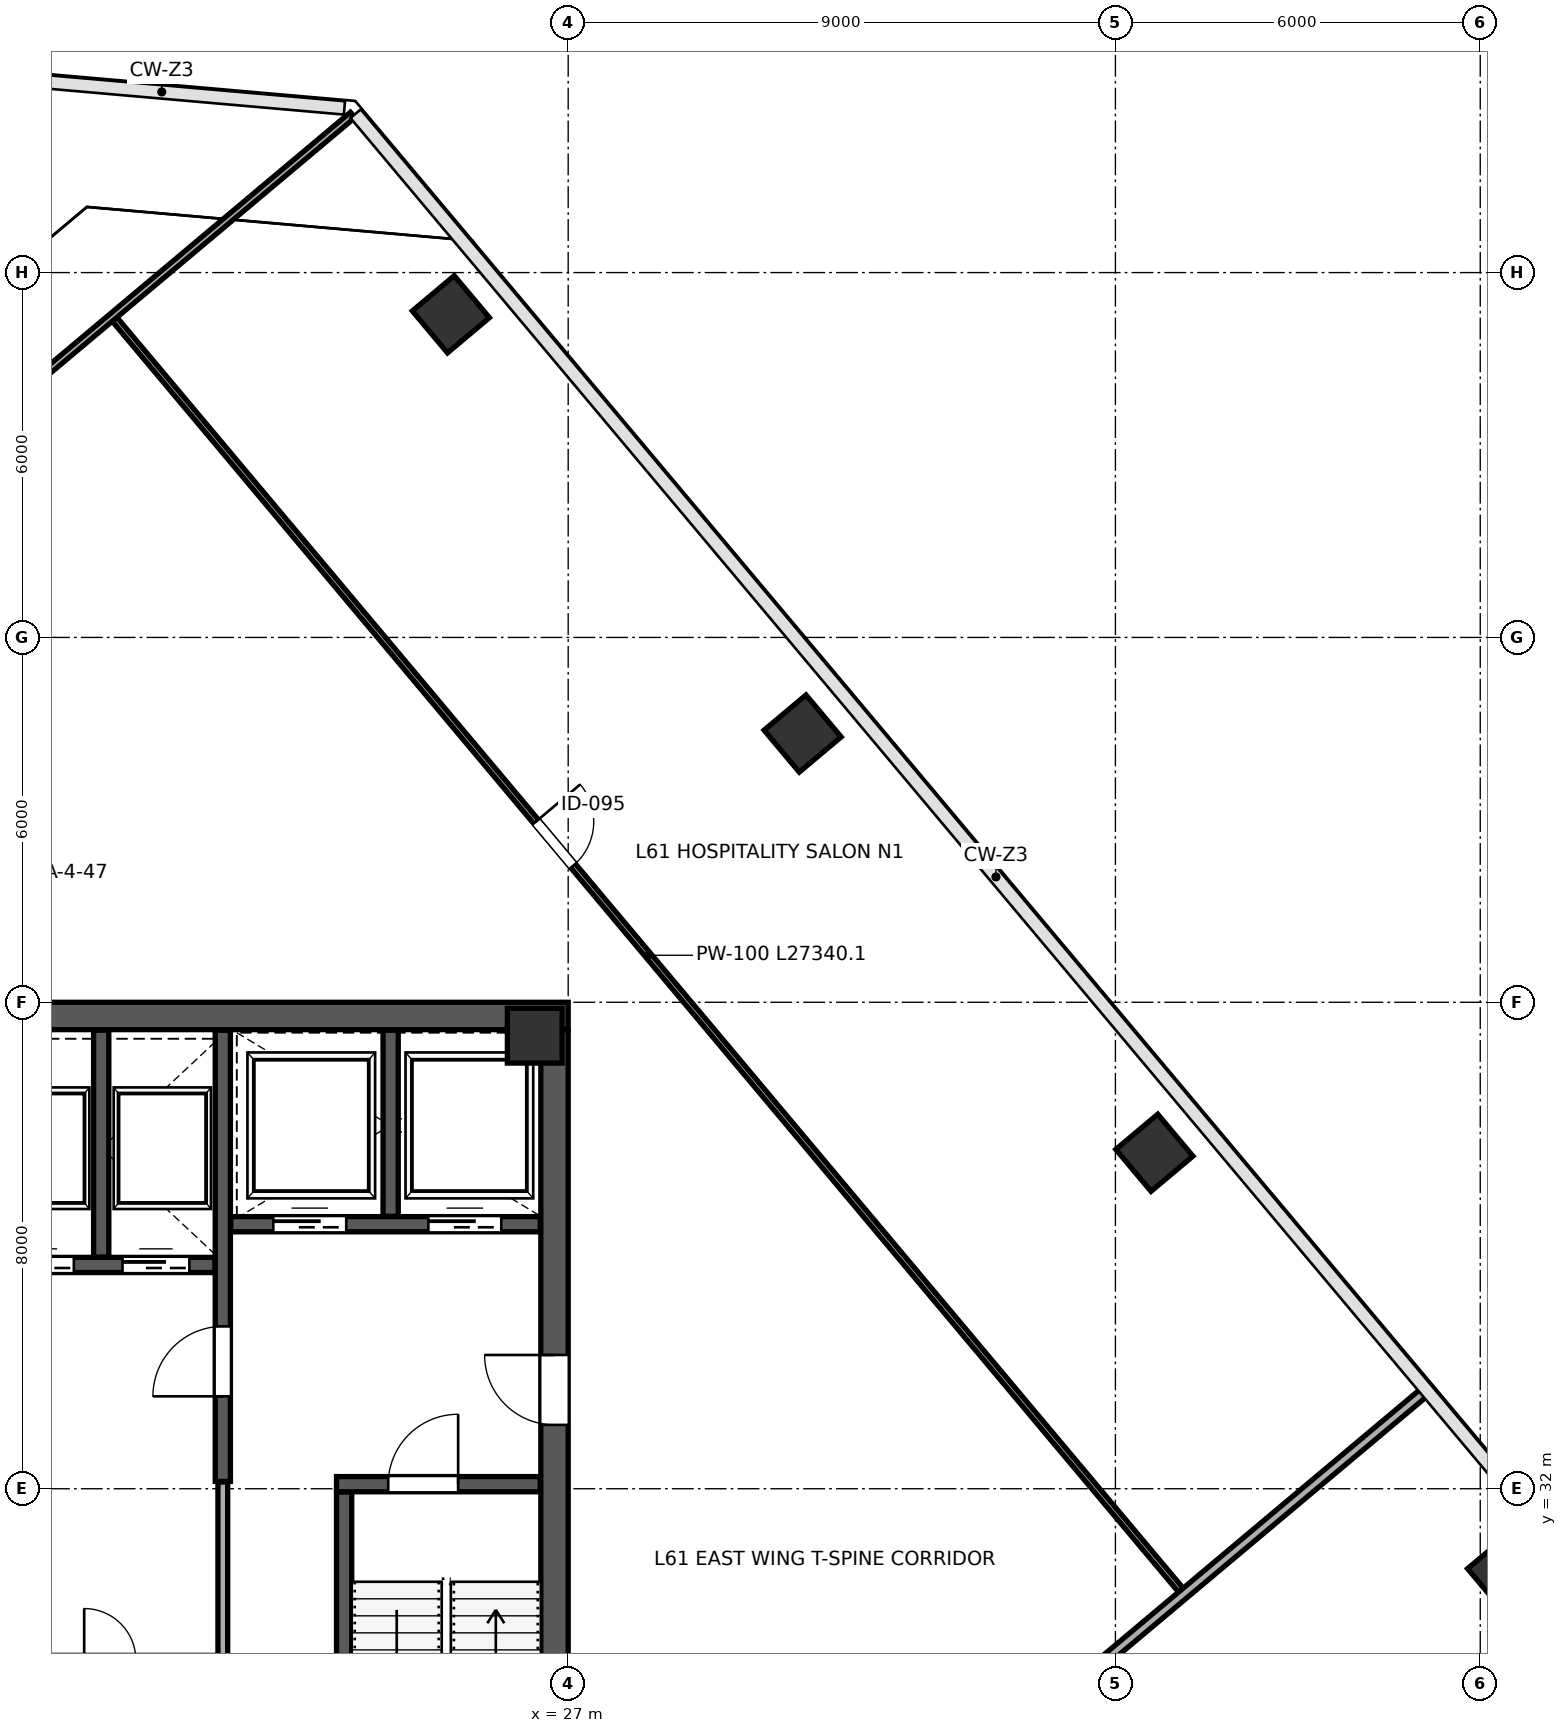
"""IFC4 building model, lengths in metres.
Left out: names, types, materials, properties, quantities, classifications, styles, units other than length and angle.
Written with IfcOpenShell. Run it as: python <this file> out.ifc"""

import sys

from ifc_helpers import new_model, si_unit, direction, frame, frame_2d, origin, origin_2d, place, context, subcontext, project, spatial, rectangle, extrude, source, transform, mapped, element, fill, save


model = new_model("IFC4")
c1 = context("Model", 3, precision=1e-05, world=origin(), true_north=direction((0.0, 1.0)))
c2 = subcontext(c1, "Body", "Model", "MODEL_VIEW")
j1 = project(units=[si_unit("LENGTHUNIT", "METRE"), si_unit("PLANEANGLEUNIT", "RADIAN")], contexts=[c1])
p1 = place(None, origin())
s1 = spatial("IfcSite", under=j1, at=p1, CompositionType="ELEMENT")
p2 = place(p1, origin())
s2 = spatial("IfcBuilding", under=s1, at=p2, CompositionType="ELEMENT")
p3 = place(p2, frame((0.0, 0.0, 271.0)))
s3 = spatial("IfcBuildingStorey", under=s2, at=p3, CompositionType="ELEMENT", Elevation=271.0)
m1 = source(origin(), c2, "Body", "SweptSolid", [
    extrude(rectangle(XDim=0.9, YDim=0.9, at=origin_2d()), origin(), (0.0, 0.0, 1.0), 4.198),
])
p4 = place(p3, frame((26.45, 39.45, 0.001), z_axis=(0.0, 0.0, 1.0), x_axis=(1.0, 0.0, 0.0)))
e1 = element("IfcColumn", 1, at=p4, inside=s3, PredefinedType="COLUMN", context=c2, shape_type="MappedRepresentation", body=[
    mapped(m1, transform((0.0, 0.0, 0.0), scale=1.0)),
])
m2 = source(origin(), c2, "Body", "SweptSolid", [
    extrude(rectangle(XDim=0.9, YDim=0.9, at=origin_2d()), origin(), (0.0, 0.0, 1.0), 4.198),
])
for number, where, z_axis, x_axis in (
    (2, (25.071, 51.314, 0.001), (0.0, 0.0, 1.0), (-0.643, 0.766, 0.0)),
    (3, (30.856, 44.419, 0.001), (0.0, 0.0, 1.0), (-0.643, 0.766, 0.0)),
    (4, (36.641, 37.525, 0.001), (0.0, 0.0, 1.0), (-0.643, 0.766, 0.0)),
    (5, (42.426, 30.631, 0.001), (0.0, 0.0, 1.0), (-0.643, 0.766, 0.0)),
):
    element("IfcColumn", number, at=place(p3, frame(where, z_axis=z_axis, x_axis=x_axis)), inside=s3, PredefinedType="COLUMN", context=c2, shape_type="MappedRepresentation", body=[
        mapped(m2, transform((0.0, 0.0, 0.0), scale=1.0)),
    ])
p5 = place(p3, frame((26.775, 24.45, 0.0), z_axis=(0.0, 0.0, 1.0), x_axis=(0.0, 1.0, 0.0)))
e6 = element("IfcWall", 6, at=p5, inside=s3, PredefinedType="SHEAR", context=c2, shape_type="SweptSolid", body=[
    extrude(rectangle(XDim=15.1, YDim=0.45, at=frame_2d((7.55, 0.0))), origin(), (0.0, 0.0, 1.0), 3.96),
])
p6 = place(p5, frame((8.6, 0.0, 0.0)))
e7 = element("IfcOpeningElement", 7, at=p6, cuts=e6, PredefinedType="OPENING", context=c2, shape_type="SweptSolid", body=[
    extrude(rectangle(XDim=1.15, YDim=2.2, at=frame_2d((0.575, 1.1))), frame((0.0, 0.235, 0.0), z_axis=(0.0, -1.0, 0.0), x_axis=(1.0, 0.0, 0.0)), (0.0, 0.0, 1.0), 0.47),
])
p7 = place(p3, frame((9.0, 39.775, 0.0), z_axis=(0.0, 0.0, 1.0), x_axis=(1.0, 0.0, 0.0)))
e8 = element("IfcWall", 8, at=p7, inside=s3, PredefinedType="SHEAR", context=c2, shape_type="SweptSolid", body=[
    extrude(rectangle(XDim=18.0, YDim=0.45, at=frame_2d((9.0, 0.0))), origin(), (0.0, 0.0, 1.0), 3.96),
])
p8 = place(p3, frame((23.315, 24.46, 0.0), z_axis=(0.0, 0.0, 1.0), x_axis=(0.0, 1.0, 0.0)))
e9 = element("IfcWall", 9, at=p8, inside=s3, PredefinedType="SHEAR", context=c2, shape_type="SweptSolid", body=[
    extrude(rectangle(XDim=7.49, YDim=0.25, at=frame_2d((3.745, 0.0))), origin(), (0.0, 0.0, 1.0), 3.96),
])
p9 = place(p3, frame((23.19, 32.075, 0.0), z_axis=(0.0, 0.0, 1.0), x_axis=(1.0, 0.0, 0.0)))
e10 = element("IfcWall", 10, at=p9, inside=s3, PredefinedType="SHEAR", context=c2, shape_type="SweptSolid", body=[
    extrude(rectangle(XDim=3.35, YDim=0.25, at=frame_2d((1.675, 0.0))), origin(), (0.0, 0.0, 1.0), 3.96),
])
p10 = place(p9, frame((0.85, 0.0, 0.0)))
e11 = element("IfcOpeningElement", 11, at=p10, cuts=e10, PredefinedType="OPENING", context=c2, shape_type="SweptSolid", body=[
    extrude(rectangle(XDim=1.15, YDim=2.2, at=frame_2d((0.575, 1.1))), frame((0.0, 0.135, 0.0), z_axis=(0.0, -1.0, 0.0), x_axis=(1.0, 0.0, 0.0)), (0.0, 0.0, 1.0), 0.27),
])
p11 = place(p3, frame((21.32, 32.12, 0.0), z_axis=(0.0, 0.0, 1.0), x_axis=(0.0, 1.0, 0.0)))
e12 = element("IfcWall", 12, at=p11, inside=s3, PredefinedType="SHEAR", context=c2, shape_type="SweptSolid", body=[
    extrude(rectangle(XDim=7.42, YDim=0.25, at=frame_2d((3.71, 0.0))), origin(), (0.0, 0.0, 1.0), 3.96),
])
p12 = place(p11, frame((1.4, 0.0, 0.0)))
e13 = element("IfcOpeningElement", 13, at=p12, cuts=e12, PredefinedType="OPENING", context=c2, shape_type="SweptSolid", body=[
    extrude(rectangle(XDim=1.15, YDim=2.2, at=frame_2d((0.575, 1.1))), frame((0.0, 0.135, 0.0), z_axis=(0.0, -1.0, 0.0), x_axis=(1.0, 0.0, 0.0)), (0.0, 0.0, 1.0), 0.27),
])
p13 = place(p3, frame((21.45, 36.35, 0.0), z_axis=(0.0, 0.0, 1.0), x_axis=(1.0, 0.0, 0.0)))
e14 = element("IfcWall", 14, at=p13, inside=s3, PredefinedType="SHEAR", context=c2, shape_type="SweptSolid", body=[
    extrude(rectangle(XDim=5.09, YDim=0.25, at=frame_2d((2.545, 0.0))), origin(), (0.0, 0.0, 1.0), 3.96),
])
p14 = place(p13, frame((0.7, 0.0, 0.0)))
e15 = element("IfcOpeningElement", 15, at=p14, cuts=e14, PredefinedType="OPENING", context=c2, shape_type="SweptSolid", body=[
    extrude(rectangle(XDim=1.2, YDim=2.2, at=frame_2d((0.6, 1.1))), frame((0.0, 0.135, 0.0), z_axis=(0.0, -1.0, 0.0), x_axis=(1.0, 0.0, 0.0)), (0.0, 0.0, 1.0), 0.27),
])
p15 = place(p13, frame((3.25, 0.0, 0.0)))
e16 = element("IfcOpeningElement", 16, at=p15, cuts=e14, PredefinedType="OPENING", context=c2, shape_type="SweptSolid", body=[
    extrude(rectangle(XDim=1.2, YDim=2.2, at=frame_2d((0.6, 1.1))), frame((0.0, 0.135, 0.0), z_axis=(0.0, -1.0, 0.0), x_axis=(1.0, 0.0, 0.0)), (0.0, 0.0, 1.0), 0.27),
])
p16 = place(p3, frame((24.08, 36.48, 0.0), z_axis=(0.0, 0.0, 1.0), x_axis=(0.0, 1.0, 0.0)))
e17 = element("IfcWall", 17, at=p16, inside=s3, PredefinedType="SHEAR", context=c2, shape_type="SweptSolid", body=[
    extrude(rectangle(XDim=3.06, YDim=0.25, at=frame_2d((1.53, 0.0))), origin(), (0.0, 0.0, 1.0), 3.96),
])
p17 = place(p3, frame((17.32, 35.68, 0.0), z_axis=(0.0, 0.0, 1.0), x_axis=(1.0, 0.0, 0.0)))
e18 = element("IfcWall", 18, at=p17, inside=s3, PredefinedType="SHEAR", context=c2, shape_type="SweptSolid", body=[
    extrude(rectangle(XDim=3.87, YDim=0.25, at=frame_2d((1.935, 0.0))), origin(), (0.0, 0.0, 1.0), 3.96),
])
p18 = place(p17, frame((0.45, 0.0, 0.0)))
e19 = element("IfcOpeningElement", 19, at=p18, cuts=e18, PredefinedType="OPENING", context=c2, shape_type="SweptSolid", body=[
    extrude(rectangle(XDim=1.1, YDim=2.2, at=frame_2d((0.55, 1.1))), frame((0.0, 0.135, 0.0), z_axis=(0.0, -1.0, 0.0), x_axis=(1.0, 0.0, 0.0)), (0.0, 0.0, 1.0), 0.27),
])
p19 = place(p17, frame((2.35, 0.0, 0.0)))
e20 = element("IfcOpeningElement", 20, at=p19, cuts=e18, PredefinedType="OPENING", context=c2, shape_type="SweptSolid", body=[
    extrude(rectangle(XDim=1.1, YDim=2.2, at=frame_2d((0.55, 1.1))), frame((0.0, 0.135, 0.0), z_axis=(0.0, -1.0, 0.0), x_axis=(1.0, 0.0, 0.0)), (0.0, 0.0, 1.0), 0.27),
])
p20 = place(p3, frame((19.32, 35.81, 0.0), z_axis=(0.0, 0.0, 1.0), x_axis=(0.0, 1.0, 0.0)))
e21 = element("IfcWall", 21, at=p20, inside=s3, PredefinedType="SHEAR", context=c2, shape_type="SweptSolid", body=[
    extrude(rectangle(XDim=3.73, YDim=0.25, at=frame_2d((1.865, 0.0))), origin(), (0.0, 0.0, 1.0), 3.96),
])
p21 = place(p3, frame((21.32, 29.19, 0.0), z_axis=(0.0, 0.0, 1.0), x_axis=(0.0, 1.0, 0.0)))
e22 = element("IfcWall", 22, at=p21, inside=s3, PredefinedType="PARTITIONING", context=c2, shape_type="SweptSolid", body=[
    extrude(rectangle(XDim=2.92, YDim=0.16, at=frame_2d((1.46, 0.0))), origin(), (0.0, 0.0, 1.0), 3.96),
])
p22 = place(p3, frame((19.528, 51.245, 0.0), z_axis=(0.0, 0.0, 1.0), x_axis=(0.642782364439, -0.766048844374, 0.0)))
e23 = element("IfcWall", 23, at=p22, inside=s3, PredefinedType="PARTITIONING", context=c2, shape_type="SweptSolid", body=[
    extrude(rectangle(XDim=27.34, YDim=0.1, at=frame_2d((13.67, 0.0))), origin(), (0.0, 0.0, 1.0), 3.96),
])
p23 = place(p22, frame((10.8, 0.0, 0.0)))
e24 = element("IfcOpeningElement", 24, at=p23, cuts=e23, PredefinedType="OPENING", context=c2, shape_type="SweptSolid", body=[
    extrude(rectangle(XDim=0.95, YDim=2.15, at=frame_2d((0.475, 1.075))), frame((0.0, 0.06, 0.0), z_axis=(0.0, -1.0, 0.0), x_axis=(1.0, 0.0, 0.0)), (0.0, 0.0, 1.0), 0.12),
])
p24 = place(p3, frame((0.849, 35.624, 0.0), z_axis=(0.0, 0.0, 1.0), x_axis=(0.766042777978, 0.642789594119, 0.0)))
e25 = element("IfcWall", 25, at=p24, inside=s3, PredefinedType="PARTITIONING", context=c2, shape_type="SweptSolid", body=[
    extrude(rectangle(XDim=29.51, YDim=0.115, at=frame_2d((14.755, 0.0))), origin(), (0.0, 0.0, 1.0), 3.96),
])
p25 = place(p24, frame((2.6, 0.0, 0.0)))
e26 = element("IfcOpeningElement", 26, at=p25, cuts=e25, PredefinedType="OPENING", context=c2, shape_type="SweptSolid", body=[
    extrude(rectangle(XDim=0.95, YDim=2.15, at=frame_2d((0.475, 1.075))), frame((0.0, 0.067, 0.0), z_axis=(0.0, -1.0, 0.0), x_axis=(1.0, 0.0, 0.0)), (0.0, 0.0, 1.0), 0.135),
])
p26 = place(p3, frame((25.576, 20.577, 0.0), z_axis=(0.0, 0.0, 1.0), x_axis=(0.76604764673, 0.642783791752, 0.0)))
e27 = element("IfcWall", 27, at=p26, inside=s3, PredefinedType="PARTITIONING", context=c2, shape_type="SweptSolid", body=[
    extrude(rectangle(XDim=20.24, YDim=0.16, at=frame_2d((10.12, 0.0))), origin(), (0.0, 0.0, 1.0), 3.195),
])
p27 = place(p3, frame((28.796, 16.74, 0.0), z_axis=(0.0, 0.0, 1.0), x_axis=(0.766036723368, 0.642796809616, 0.0)))
e28 = element("IfcWall", 28, at=p27, inside=s3, PredefinedType="PARTITIONING", context=c2, shape_type="SweptSolid", body=[
    extrude(rectangle(XDim=20.24, YDim=0.135, at=frame_2d((10.12, 0.0))), origin(), (0.0, 0.0, 1.0), 3.96),
])
m3 = source(origin(), c2, "Body", "SweptSolid", [
    extrude(rectangle(XDim=1.15, YDim=2.2, at=frame_2d((0.575, 1.1))), frame((0.0, 0.025, 0.0), z_axis=(0.0, -1.0, 0.0), x_axis=(1.0, 0.0, 0.0)), (0.0, 0.0, 1.0), 0.05),
])
p28 = place(p12, origin())
e29 = element("IfcDoor", 29, at=p28, inside=s3, OperationType="SINGLE_SWING_LEFT", PredefinedType="DOOR", context=c2, shape_type="MappedRepresentation", body=[
    mapped(m3, transform((0.0, 0.0, 0.0), scale=1.0)),
])
fill(e13, e29)
m4 = source(origin(), c2, "Body", "SweptSolid", [
    extrude(rectangle(XDim=1.15, YDim=2.2, at=frame_2d((0.575, 1.1))), frame((0.0, 0.025, 0.0), z_axis=(0.0, -1.0, 0.0), x_axis=(1.0, 0.0, 0.0)), (0.0, 0.0, 1.0), 0.05),
])
p29 = place(p10, origin())
e30 = element("IfcDoor", 30, at=p29, inside=s3, OperationType="SINGLE_SWING_RIGHT", PredefinedType="DOOR", context=c2, shape_type="MappedRepresentation", body=[
    mapped(m4, transform((0.0, 0.0, 0.0), scale=1.0)),
])
fill(e11, e30)
p30 = place(p6, origin())
e31 = element("IfcDoor", 31, at=p30, inside=s3, OperationType="SINGLE_SWING_RIGHT", PredefinedType="DOOR", context=c2, shape_type="MappedRepresentation", body=[
    mapped(m3, transform((0.0, 0.0, 0.0), scale=1.0)),
])
fill(e7, e31)
m5 = source(origin(), c2, "Body", "SweptSolid", [
    extrude(rectangle(XDim=1.1, YDim=2.2, at=frame_2d((0.55, 1.1))), frame((0.0, 0.025, 0.0), z_axis=(0.0, -1.0, 0.0), x_axis=(1.0, 0.0, 0.0)), (0.0, 0.0, 1.0), 0.05),
])
p31 = place(p18, origin())
e32 = element("IfcDoor", 32, at=p31, inside=s3, OperationType="SLIDING_TO_LEFT", PredefinedType="DOOR", context=c2, shape_type="MappedRepresentation", body=[
    mapped(m5, transform((0.0, 0.0, 0.0), scale=1.0)),
])
fill(e19, e32)
p32 = place(p19, origin())
e33 = element("IfcDoor", 33, at=p32, inside=s3, OperationType="SLIDING_TO_RIGHT", PredefinedType="DOOR", context=c2, shape_type="MappedRepresentation", body=[
    mapped(m5, transform((0.0, 0.0, 0.0), scale=1.0)),
])
fill(e20, e33)
m6 = source(origin(), c2, "Body", "SweptSolid", [
    extrude(rectangle(XDim=1.2, YDim=2.2, at=frame_2d((0.6, 1.1))), frame((0.0, 0.025, 0.0), z_axis=(0.0, -1.0, 0.0), x_axis=(1.0, 0.0, 0.0)), (0.0, 0.0, 1.0), 0.05),
])
p33 = place(p14, origin())
e34 = element("IfcDoor", 34, at=p33, inside=s3, OperationType="SLIDING_TO_LEFT", PredefinedType="DOOR", context=c2, shape_type="MappedRepresentation", body=[
    mapped(m6, transform((0.0, 0.0, 0.0), scale=1.0)),
])
fill(e15, e34)
p34 = place(p15, origin())
e35 = element("IfcDoor", 35, at=p34, inside=s3, OperationType="SLIDING_TO_RIGHT", PredefinedType="DOOR", context=c2, shape_type="MappedRepresentation", body=[
    mapped(m6, transform((0.0, 0.0, 0.0), scale=1.0)),
])
fill(e16, e35)
m7 = source(origin(), c2, "Body", "SweptSolid", [
    extrude(rectangle(XDim=0.95, YDim=2.15, at=frame_2d((0.475, 1.075))), frame((0.0, 0.025, 0.0), z_axis=(0.0, -1.0, 0.0), x_axis=(1.0, 0.0, 0.0)), (0.0, 0.0, 1.0), 0.05),
])
p35 = place(p23, origin())
e36 = element("IfcDoor", 36, at=p35, inside=s3, OperationType="SINGLE_SWING_LEFT", PredefinedType="DOOR", context=c2, shape_type="MappedRepresentation", body=[
    mapped(m7, transform((0.0, 0.0, 0.0), scale=1.0)),
])
fill(e24, e36)
save(model, sys.argv[1])
